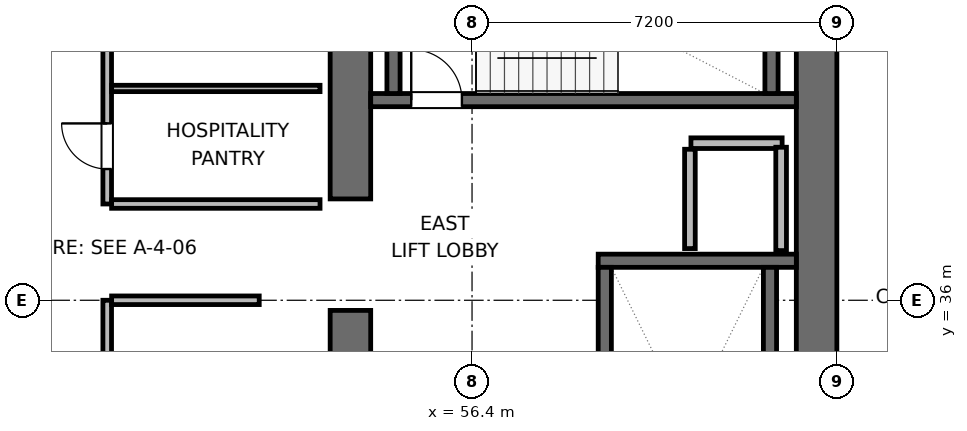
"""IFC4 building model, lengths in metres.
Left out: names, types, materials, properties, quantities, classifications, styles, units other than length and angle.
Written with IfcOpenShell. Run it as: python <this file> out.ifc"""

import sys

from ifc_helpers import new_model, si_unit, direction, frame, frame_2d, origin, place, context, subcontext, project, spatial, rectangle, extrude, element, fill, save


model = new_model("IFC4")
c1 = context("Model", 3, precision=1e-05, world=origin(), true_north=direction((0.0, 1.0)))
c2 = subcontext(c1, "Body", "Model", "MODEL_VIEW")
j1 = project(units=[si_unit("LENGTHUNIT", "METRE"), si_unit("PLANEANGLEUNIT", "RADIAN")], contexts=[c1])
p1 = place(None, origin())
s1 = spatial("IfcSite", under=j1, at=p1, CompositionType="ELEMENT")
p2 = place(p1, origin())
s2 = spatial("IfcBuilding", under=s1, at=p2, CompositionType="ELEMENT")
p3 = place(p2, frame((0.0, 0.0, 97.5)))
s3 = spatial("IfcBuildingStorey", under=s2, at=p3, CompositionType="ELEMENT", Elevation=97.5)
p4 = place(p3, frame((54.0, 28.0, 0.0), z_axis=(0.0, 0.0, 1.0), x_axis=(0.0, 1.0, 0.0)))
e1 = element("IfcWall", 1, at=p4, inside=s3, PredefinedType="SHEAR", context=c2, shape_type="SweptSolid", body=[
    extrude(rectangle(XDim=7.8, YDim=0.8, at=frame_2d((3.9, 0.0))), origin(), (0.0, 0.0, 1.0), 3.9),
])
p5 = place(p3, frame((54.0, 38.0, 0.0), z_axis=(0.0, 0.0, 1.0), x_axis=(0.0, 1.0, 0.0)))
e2 = element("IfcWall", 2, at=p5, inside=s3, PredefinedType="SHEAR", context=c2, shape_type="SweptSolid", body=[
    extrude(rectangle(XDim=6.0, YDim=0.8, at=frame_2d((3.0, 0.0))), origin(), (0.0, 0.0, 1.0), 3.9),
])
p6 = place(p3, frame((63.2, 27.6, 0.0), z_axis=(0.0, 0.0, 1.0), x_axis=(0.0, 1.0, 0.0)))
e3 = element("IfcWall", 3, at=p6, inside=s3, PredefinedType="SHEAR", context=c2, shape_type="SweptSolid", body=[
    extrude(rectangle(XDim=16.8, YDim=0.8, at=frame_2d((8.4, 0.0))), origin(), (0.0, 0.0, 1.0), 3.9),
])
p7 = place(p3, frame((58.89, 36.78, 0.0), z_axis=(0.0, 0.0, 1.0), x_axis=(1.0, 0.0, 0.0)))
e4 = element("IfcWall", 4, at=p7, inside=s3, PredefinedType="SHEAR", context=c2, shape_type="SweptSolid", body=[
    extrude(rectangle(XDim=3.91, YDim=0.26, at=frame_2d((1.955, 0.0))), origin(), (0.0, 0.0, 1.0), 3.9),
])
p8 = place(p3, frame((59.02, 29.05, 0.0), z_axis=(0.0, 0.0, 1.0), x_axis=(0.0, 1.0, 0.0)))
e5 = element("IfcWall", 5, at=p8, inside=s3, PredefinedType="SHEAR", context=c2, shape_type="SweptSolid", body=[
    extrude(rectangle(XDim=7.6, YDim=0.26, at=frame_2d((3.8, 0.0))), origin(), (0.0, 0.0, 1.0), 3.9),
])
p9 = place(p8, frame((0.3, 0.0, 0.0)))
e6 = element("IfcOpeningElement", 6, at=p9, cuts=e5, PredefinedType="OPENING", context=c2, shape_type="SweptSolid", body=[
    extrude(rectangle(XDim=1.0, YDim=2.04, at=frame_2d((0.5, 1.02))), frame((0.0, 0.14, 0.0), z_axis=(0.0, -1.0, 0.0), x_axis=(1.0, 0.0, 0.0)), (0.0, 0.0, 1.0), 0.28),
])
p10 = place(p3, frame((62.28, 29.05, 0.0), z_axis=(0.0, 0.0, 1.0), x_axis=(0.0, 1.0, 0.0)))
e7 = element("IfcWall", 7, at=p10, inside=s3, PredefinedType="SHEAR", context=c2, shape_type="SweptSolid", body=[
    extrude(rectangle(XDim=7.6, YDim=0.26, at=frame_2d((3.8, 0.0))), origin(), (0.0, 0.0, 1.0), 3.9),
])
p11 = place(p3, frame((54.4, 39.95, 0.0), z_axis=(0.0, 0.0, 1.0), x_axis=(1.0, 0.0, 0.0)))
e8 = element("IfcWall", 8, at=p11, inside=s3, PredefinedType="SHEAR", context=c2, shape_type="SweptSolid", body=[
    extrude(rectangle(XDim=8.4, YDim=0.26, at=frame_2d((4.2, 0.0))), origin(), (0.0, 0.0, 1.0), 3.9),
])
p12 = place(p11, frame((0.8, 0.0, 0.0)))
e9 = element("IfcOpeningElement", 9, at=p12, cuts=e8, PredefinedType="OPENING", context=c2, shape_type="SweptSolid", body=[
    extrude(rectangle(XDim=1.0, YDim=2.04, at=frame_2d((0.5, 1.02))), frame((0.0, 0.14, 0.0), z_axis=(0.0, -1.0, 0.0), x_axis=(1.0, 0.0, 0.0)), (0.0, 0.0, 1.0), 0.28),
])
for number, where, z_axis, x_axis in (
    (10, (54.85, 40.08, 0.0), (0.0, 0.0, 1.0), (0.0, 1.0, 0.0)),
    (11, (62.31, 40.08, 0.0), (0.0, 0.0, 1.0), (0.0, 1.0, 0.0)),
):
    element("IfcWall", number, at=place(p3, frame(where, z_axis=z_axis, x_axis=x_axis)), inside=s3, PredefinedType="SHEAR", context=c2, shape_type="SweptSolid", body=[
        extrude(rectangle(XDim=2.94, YDim=0.26, at=frame_2d((1.47, 0.0))), origin(), (0.0, 0.0, 1.0), 3.9),
    ])
p13 = place(p3, frame((60.72, 39.1, 0.0), z_axis=(0.0, 0.0, 1.0), x_axis=(1.0, 0.0, 0.0)))
e12 = element("IfcWall", 12, at=p13, inside=s3, PredefinedType="PARTITIONING", context=c2, shape_type="SweptSolid", body=[
    extrude(rectangle(XDim=1.8, YDim=0.21, at=frame_2d((0.9, 0.0))), origin(), (0.0, 0.0, 1.0), 3.64),
])
p14 = place(p3, frame((60.7, 37.02, 0.0), z_axis=(0.0, 0.0, 1.0), x_axis=(0.0, 1.0, 0.0)))
e13 = element("IfcWall", 13, at=p14, inside=s3, PredefinedType="PARTITIONING", context=c2, shape_type="SweptSolid", body=[
    extrude(rectangle(XDim=1.96, YDim=0.21, at=frame_2d((0.98, 0.0))), origin(), (0.0, 0.0, 1.0), 3.64),
])
p15 = place(p3, frame((62.5, 36.98, 0.0), z_axis=(0.0, 0.0, 1.0), x_axis=(0.0, 1.0, 0.0)))
e14 = element("IfcWall", 14, at=p15, inside=s3, PredefinedType="PARTITIONING", context=c2, shape_type="SweptSolid", body=[
    extrude(rectangle(XDim=2.04, YDim=0.21, at=frame_2d((1.02, 0.0))), origin(), (0.0, 0.0, 1.0), 3.64),
])
p16 = place(p3, frame((49.2, 32.6, 0.0), z_axis=(0.0, 0.0, 1.0), x_axis=(0.0, 1.0, 0.0)))
e15 = element("IfcWall", 15, at=p16, inside=s3, PredefinedType="PARTITIONING", context=c2, shape_type="SweptSolid", body=[
    extrude(rectangle(XDim=3.4, YDim=0.17, at=frame_2d((1.7, 0.0))), origin(), (0.0, 0.0, 1.0), 3.64),
])
p17 = place(p16, frame((0.638, 0.0, 0.0)))
e16 = element("IfcOpeningElement", 16, at=p17, cuts=e15, PredefinedType="OPENING", context=c2, shape_type="SweptSolid", body=[
    extrude(rectangle(XDim=0.9, YDim=2.02, at=frame_2d((0.45, 1.01))), frame((0.0, 0.095, 0.0), z_axis=(0.0, -1.0, 0.0), x_axis=(1.0, 0.0, 0.0)), (0.0, 0.0, 1.0), 0.19),
])
p18 = place(p3, frame((49.287, 36.0, 0.0), z_axis=(0.0, 0.0, 1.0), x_axis=(1.0, 0.0, 0.0)))
e17 = element("IfcWall", 17, at=p18, inside=s3, PredefinedType="PARTITIONING", context=c2, shape_type="SweptSolid", body=[
    extrude(rectangle(XDim=2.913, YDim=0.17, at=frame_2d((1.457, 0.0))), origin(), (0.0, 0.0, 1.0), 3.64),
])
p19 = place(p3, frame((49.2, 37.9, 0.0), z_axis=(0.0, 0.0, 1.0), x_axis=(0.0, 1.0, 0.0)))
e18 = element("IfcWall", 18, at=p19, inside=s3, PredefinedType="PARTITIONING", context=c2, shape_type="SweptSolid", body=[
    extrude(rectangle(XDim=6.0, YDim=0.17, at=frame_2d((3.0, 0.0))), origin(), (0.0, 0.0, 1.0), 3.64),
])
p20 = place(p19, frame((0.69, 0.0, 0.0)))
e19 = element("IfcOpeningElement", 19, at=p20, cuts=e18, PredefinedType="OPENING", context=c2, shape_type="SweptSolid", body=[
    extrude(rectangle(XDim=0.9, YDim=2.02, at=frame_2d((0.45, 1.01))), frame((0.0, 0.095, 0.0), z_axis=(0.0, -1.0, 0.0), x_axis=(1.0, 0.0, 0.0)), (0.0, 0.0, 1.0), 0.19),
])
p21 = place(p19, frame((3.69, 0.0, 0.0)))
e20 = element("IfcOpeningElement", 20, at=p21, cuts=e18, PredefinedType="OPENING", context=c2, shape_type="SweptSolid", body=[
    extrude(rectangle(XDim=0.9, YDim=2.02, at=frame_2d((0.45, 1.01))), frame((0.0, 0.095, 0.0), z_axis=(0.0, -1.0, 0.0), x_axis=(1.0, 0.0, 0.0)), (0.0, 0.0, 1.0), 0.19),
])
p22 = place(p3, frame((49.287, 37.9, 0.0), z_axis=(0.0, 0.0, 1.0), x_axis=(1.0, 0.0, 0.0)))
e21 = element("IfcWall", 21, at=p22, inside=s3, PredefinedType="PARTITIONING", context=c2, shape_type="SweptSolid", body=[
    extrude(rectangle(XDim=4.113, YDim=0.17, at=frame_2d((2.056, 0.0))), origin(), (0.0, 0.0, 1.0), 3.64),
])
p23 = place(p3, frame((49.287, 40.18, 0.0), z_axis=(0.0, 0.0, 1.0), x_axis=(1.0, 0.0, 0.0)))
e22 = element("IfcWall", 22, at=p23, inside=s3, PredefinedType="PARTITIONING", context=c2, shape_type="SweptSolid", body=[
    extrude(rectangle(XDim=4.113, YDim=0.125, at=frame_2d((2.056, 0.0))), origin(), (0.0, 0.0, 1.0), 3.64),
])
p24 = place(p12, origin())
e23 = element("IfcDoor", 23, at=p24, inside=s3, OperationType="SINGLE_SWING_LEFT", PredefinedType="DOOR", context=c2, shape_type="SweptSolid", body=[
    extrude(rectangle(XDim=1.0, YDim=2.04, at=frame_2d((0.5, 1.02))), frame((0.0, 0.025, 0.0), z_axis=(0.0, -1.0, 0.0), x_axis=(1.0, 0.0, 0.0)), (0.0, 0.0, 1.0), 0.05),
])
fill(e9, e23)
p25 = place(p20, origin())
e24 = element("IfcDoor", 24, at=p25, inside=s3, OperationType="SINGLE_SWING_RIGHT", PredefinedType="DOOR", context=c2, shape_type="SweptSolid", body=[
    extrude(rectangle(XDim=0.9, YDim=2.02, at=frame_2d((0.45, 1.01))), frame((0.0, 0.025, 0.0), z_axis=(0.0, -1.0, 0.0), x_axis=(1.0, 0.0, 0.0)), (0.0, 0.0, 1.0), 0.05),
])
fill(e19, e24)
save(model, sys.argv[1])
